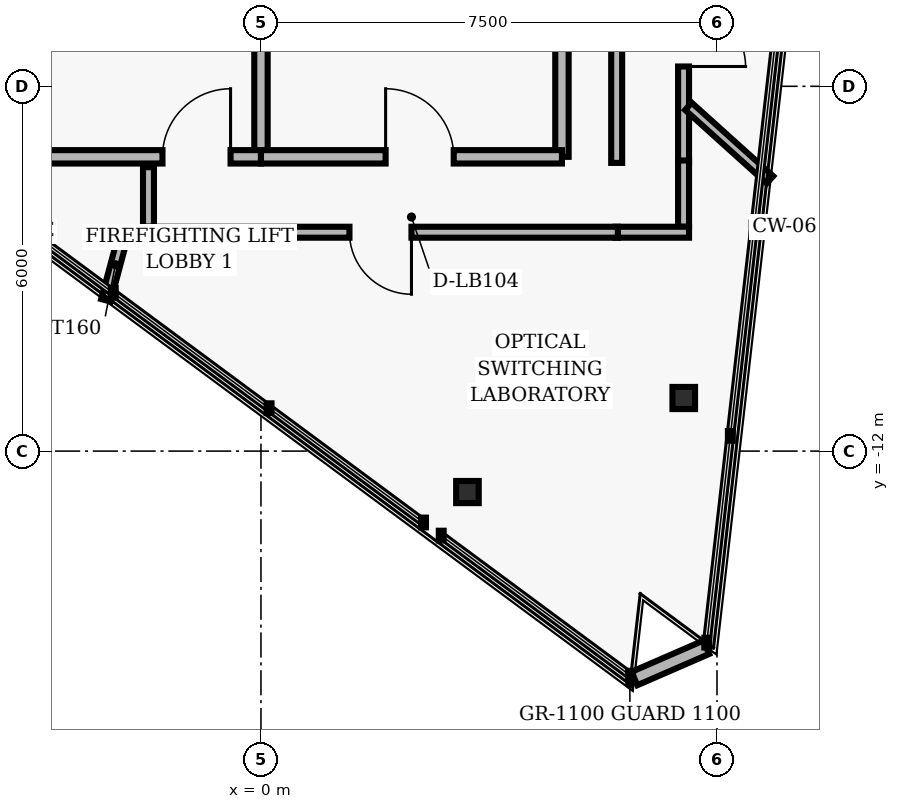
"""IFC4 building model, lengths in metres.
Left out: names, types, materials, properties, quantities, classifications, styles, units other than length and angle.
Written with IfcOpenShell. Run it as: python <this file> out.ifc"""

import sys

from ifc_helpers import new_model, si_unit, direction, frame, frame_2d, origin, origin_2d, place, context, subcontext, project, spatial, rectangle, i_section, extrude, element, fill, save


model = new_model("IFC4")
c1 = context("Model", 3, precision=1e-05, world=origin(), true_north=direction((0.0, 1.0)))
c2 = subcontext(c1, "Body", "Model", "MODEL_VIEW")
j1 = project(units=[si_unit("LENGTHUNIT", "METRE"), si_unit("PLANEANGLEUNIT", "RADIAN")], contexts=[c1])
p1 = place(None, origin())
s1 = spatial("IfcSite", under=j1, at=p1, CompositionType="ELEMENT")
p2 = place(p1, origin())
s2 = spatial("IfcBuilding", under=s1, at=p2, CompositionType="ELEMENT")
p3 = place(p2, frame((0.0, 0.0, 254.88)))
s3 = spatial("IfcBuildingStorey", under=s2, at=p3, CompositionType="ELEMENT", Elevation=254.88)
for number, where, z_axis, x_axis in (
    (1, (6.953, -11.127, 0.0), (0.0, 0.0, 1.0), (1.0, 0.0, 0.0)),
    (2, (3.396, -12.674, 0.0), (0.0, 0.0, 1.0), (1.0, 0.0, 0.0)),
):
    element("IfcColumn", number, at=place(p3, frame(where, z_axis=z_axis, x_axis=x_axis)), inside=s3, PredefinedType="COLUMN", context=c2, shape_type="SweptSolid", body=[
        extrude(i_section(OverallWidth=0.371, OverallDepth=0.364, WebThickness=0.013, FlangeThickness=0.022, FilletRadius=0.015, at=origin_2d()), origin(), (0.0, 0.0, 1.0), 2.88),
    ])
p4 = place(p3, frame((6.142, -15.74, 0.0), z_axis=(0.0, 0.0, 1.0), x_axis=(0.917064030228, 0.398739970986, 0.0)))
e3 = element("IfcWall", 3, at=p4, inside=s3, PredefinedType="PARAPET", context=c2, shape_type="SweptSolid", body=[
    extrude(rectangle(XDim=1.288, YDim=0.24, at=frame_2d((0.644, 0.0))), origin(), (0.0, 0.0, 1.0), 1.65),
])
p5 = place(p3, frame((4.95, -7.16, 0.0), z_axis=(0.0, 0.0, 1.0), x_axis=(0.0, 1.0, 0.0)))
e4 = element("IfcWall", 4, at=p5, inside=s3, PredefinedType="PARTITIONING", context=c2, shape_type="SweptSolid", body=[
    extrude(rectangle(XDim=2.71, YDim=0.22, at=frame_2d((1.355, 0.0))), origin(), (0.0, 0.0, 1.0), 2.433),
])
p6 = place(p3, frame((0.0, -7.16, 0.0), z_axis=(0.0, 0.0, 1.0), x_axis=(0.0, 1.0, 0.0)))
e5 = element("IfcWall", 5, at=p6, inside=s3, PredefinedType="PARTITIONING", context=c2, shape_type="SweptSolid", body=[
    extrude(rectangle(XDim=2.81, YDim=0.22, at=frame_2d((1.405, 0.0))), origin(), (0.0, 0.0, 1.0), 2.433),
])
p7 = place(p3, frame((-5.4, -7.16, 0.0), z_axis=(0.0, 0.0, 1.0), x_axis=(1.0, 0.0, 0.0)))
e6 = element("IfcWall", 6, at=p7, inside=s3, PredefinedType="PARTITIONING", context=c2, shape_type="SweptSolid", body=[
    extrude(rectangle(XDim=5.4, YDim=0.22, at=frame_2d((2.7, 0.0))), origin(), (0.0, 0.0, 1.0), 2.433),
])
p8 = place(p7, frame((3.78, 0.0, 0.0)))
e7 = element("IfcOpeningElement", 7, at=p8, cuts=e6, PredefinedType="OPENING", context=c2, shape_type="SweptSolid", body=[
    extrude(rectangle(XDim=1.12, YDim=2.02, at=frame_2d((0.56, 1.01))), frame((0.0, 0.12, 0.0), z_axis=(0.0, -1.0, 0.0), x_axis=(1.0, 0.0, 0.0)), (0.0, 0.0, 1.0), 0.24),
])
p9 = place(p3, frame((0.0, -7.16, 0.0), z_axis=(0.0, 0.0, 1.0), x_axis=(1.0, 0.0, 0.0)))
e8 = element("IfcWall", 8, at=p9, inside=s3, PredefinedType="PARTITIONING", context=c2, shape_type="SweptSolid", body=[
    extrude(rectangle(XDim=4.95, YDim=0.22, at=frame_2d((2.475, 0.0))), origin(), (0.0, 0.0, 1.0), 2.433),
])
p10 = place(p9, frame((2.05, 0.0, 0.0)))
e9 = element("IfcOpeningElement", 9, at=p10, cuts=e8, PredefinedType="OPENING", context=c2, shape_type="SweptSolid", body=[
    extrude(rectangle(XDim=1.12, YDim=2.02, at=frame_2d((0.56, 1.01))), frame((0.0, 0.12, 0.0), z_axis=(0.0, -1.0, 0.0), x_axis=(1.0, 0.0, 0.0)), (0.0, 0.0, 1.0), 0.24),
])
p11 = place(p3, frame((-1.85, -8.31, 0.0), z_axis=(0.0, 0.0, 1.0), x_axis=(0.0, 1.0, 0.0)))
e10 = element("IfcWall", 10, at=p11, inside=s3, PredefinedType="PARTITIONING", context=c2, shape_type="SweptSolid", body=[
    extrude(rectangle(XDim=0.98, YDim=0.18, at=frame_2d((0.49, 0.0))), origin(), (0.0, 0.0, 1.0), 2.433),
])
p12 = place(p3, frame((5.85, -7.26, 0.0), z_axis=(0.0, 0.0, 1.0), x_axis=(0.0, 1.0, 0.0)))
e11 = element("IfcWall", 11, at=p12, inside=s3, PredefinedType="PARTITIONING", context=c2, shape_type="SweptSolid", body=[
    extrude(rectangle(XDim=2.61, YDim=0.18, at=frame_2d((1.305, 0.0))), origin(), (0.0, 0.0, 1.0), 1.963),
])
p13 = place(p3, frame((6.95, 7.22, 0.0), z_axis=(0.0, 0.0, 1.0), x_axis=(0.0, -1.0, 0.0)))
e12 = element("IfcWall", 12, at=p13, inside=s3, PredefinedType="PARTITIONING", context=c2, shape_type="SweptSolid", body=[
    extrude(rectangle(XDim=14.48, YDim=0.18, at=frame_2d((7.24, 0.0))), origin(), (0.0, 0.0, 1.0), 2.433),
])
p14 = place(p13, frame((11.874, 0.0, 0.0)))
e13 = element("IfcOpeningElement", 13, at=p14, cuts=e12, PredefinedType="OPENING", context=c2, shape_type="SweptSolid", body=[
    extrude(rectangle(XDim=1.02, YDim=2.02, at=frame_2d((0.51, 1.01))), frame((0.0, 0.1, 0.0), z_axis=(0.0, -1.0, 0.0), x_axis=(1.0, 0.0, 0.0)), (0.0, 0.0, 1.0), 0.2),
])
p15 = place(p3, frame((6.95, -7.22, 0.0), z_axis=(0.0, 0.0, 1.0), x_axis=(0.0, -1.0, 0.0)))
e14 = element("IfcWall", 14, at=p15, inside=s3, PredefinedType="PARTITIONING", context=c2, shape_type="SweptSolid", body=[
    extrude(rectangle(XDim=1.09, YDim=0.18, at=frame_2d((0.545, 0.0))), origin(), (0.0, 0.0, 1.0), 1.963),
])
p16 = place(p3, frame((7.04, -8.4, 0.0), z_axis=(0.0, 0.0, 1.0), x_axis=(-1.0, 0.0, 0.0)))
e15 = element("IfcWall", 15, at=p16, inside=s3, PredefinedType="PARTITIONING", context=c2, shape_type="SweptSolid", body=[
    extrude(rectangle(XDim=1.21, YDim=0.18, at=frame_2d((0.605, 0.0))), origin(), (0.0, 0.0, 1.0), 2.433),
])
p17 = place(p3, frame((5.87, -8.4, 0.0), z_axis=(0.0, 0.0, 1.0), x_axis=(-1.0, 0.0, 0.0)))
e16 = element("IfcWall", 16, at=p17, inside=s3, PredefinedType="PARTITIONING", context=c2, shape_type="SweptSolid", body=[
    extrude(rectangle(XDim=7.81, YDim=0.18, at=frame_2d((3.905, 0.0))), origin(), (0.0, 0.0, 1.0), 2.433),
])
p18 = place(p17, frame((3.395, 0.0, 0.0)))
e17 = element("IfcOpeningElement", 17, at=p18, cuts=e16, PredefinedType="OPENING", context=c2, shape_type="SweptSolid", body=[
    extrude(rectangle(XDim=1.02, YDim=2.02, at=frame_2d((0.51, 1.01))), frame((0.0, 0.1, 0.0), z_axis=(0.0, -1.0, 0.0), x_axis=(1.0, 0.0, 0.0)), (0.0, 0.0, 1.0), 0.2),
])
p19 = place(p3, frame((-2.237, -8.35, 0.0), z_axis=(0.0, 0.0, 1.0), x_axis=(-0.258867090278, -0.965912951342, 0.0)))
e18 = element("IfcWall", 18, at=p19, inside=s3, PredefinedType="PARTITIONING", context=c2, shape_type="SweptSolid", body=[
    extrude(rectangle(XDim=1.211, YDim=0.16, at=frame_2d((0.605, 0.0))), origin(), (0.0, 0.0, 1.0), 2.433),
])
p20 = place(p3, frame((7.03, -6.33, 0.0), z_axis=(0.0, 0.0, 1.0), x_axis=(0.743152807618, -0.669121741188, 0.0)))
e19 = element("IfcWall", 19, at=p20, inside=s3, PredefinedType="PARTITIONING", context=c2, shape_type="SweptSolid", body=[
    extrude(rectangle(XDim=1.804, YDim=0.16, at=frame_2d((0.902, 0.0))), origin(), (0.0, 0.0, 1.0), 2.433),
])
p21 = place(p8, origin())
e20 = element("IfcDoor", 20, at=p21, inside=s3, OperationType="SINGLE_SWING_RIGHT", PredefinedType="DOOR", context=c2, shape_type="SweptSolid", body=[
    extrude(rectangle(XDim=1.12, YDim=2.02, at=frame_2d((0.56, 1.01))), frame((0.0, 0.025, 0.0), z_axis=(0.0, -1.0, 0.0), x_axis=(1.0, 0.0, 0.0)), (0.0, 0.0, 1.0), 0.05),
])
fill(e7, e20)
p22 = place(p10, origin())
e21 = element("IfcDoor", 21, at=p22, inside=s3, OperationType="SINGLE_SWING_LEFT", PredefinedType="DOOR", context=c2, shape_type="SweptSolid", body=[
    extrude(rectangle(XDim=1.12, YDim=2.02, at=frame_2d((0.56, 1.01))), frame((0.0, 0.025, 0.0), z_axis=(0.0, -1.0, 0.0), x_axis=(1.0, 0.0, 0.0)), (0.0, 0.0, 1.0), 0.05),
])
fill(e9, e21)
p23 = place(p18, origin())
e22 = element("IfcDoor", 22, at=p23, inside=s3, OperationType="SINGLE_SWING_LEFT", PredefinedType="DOOR", context=c2, shape_type="SweptSolid", body=[
    extrude(rectangle(XDim=1.02, YDim=2.02, at=frame_2d((0.51, 1.01))), frame((0.0, 0.025, 0.0), z_axis=(0.0, -1.0, 0.0), x_axis=(1.0, 0.0, 0.0)), (0.0, 0.0, 1.0), 0.05),
])
fill(e17, e22)
p24 = place(p14, origin())
e23 = element("IfcDoor", 23, at=p24, inside=s3, OperationType="SINGLE_SWING_RIGHT", PredefinedType="DOOR", context=c2, shape_type="SweptSolid", body=[
    extrude(rectangle(XDim=1.02, YDim=2.02, at=frame_2d((0.51, 1.01))), frame((0.0, 0.025, 0.0), z_axis=(0.0, -1.0, 0.0), x_axis=(1.0, 0.0, 0.0)), (0.0, 0.0, 1.0), 0.05),
])
fill(e13, e23)
save(model, sys.argv[1])
